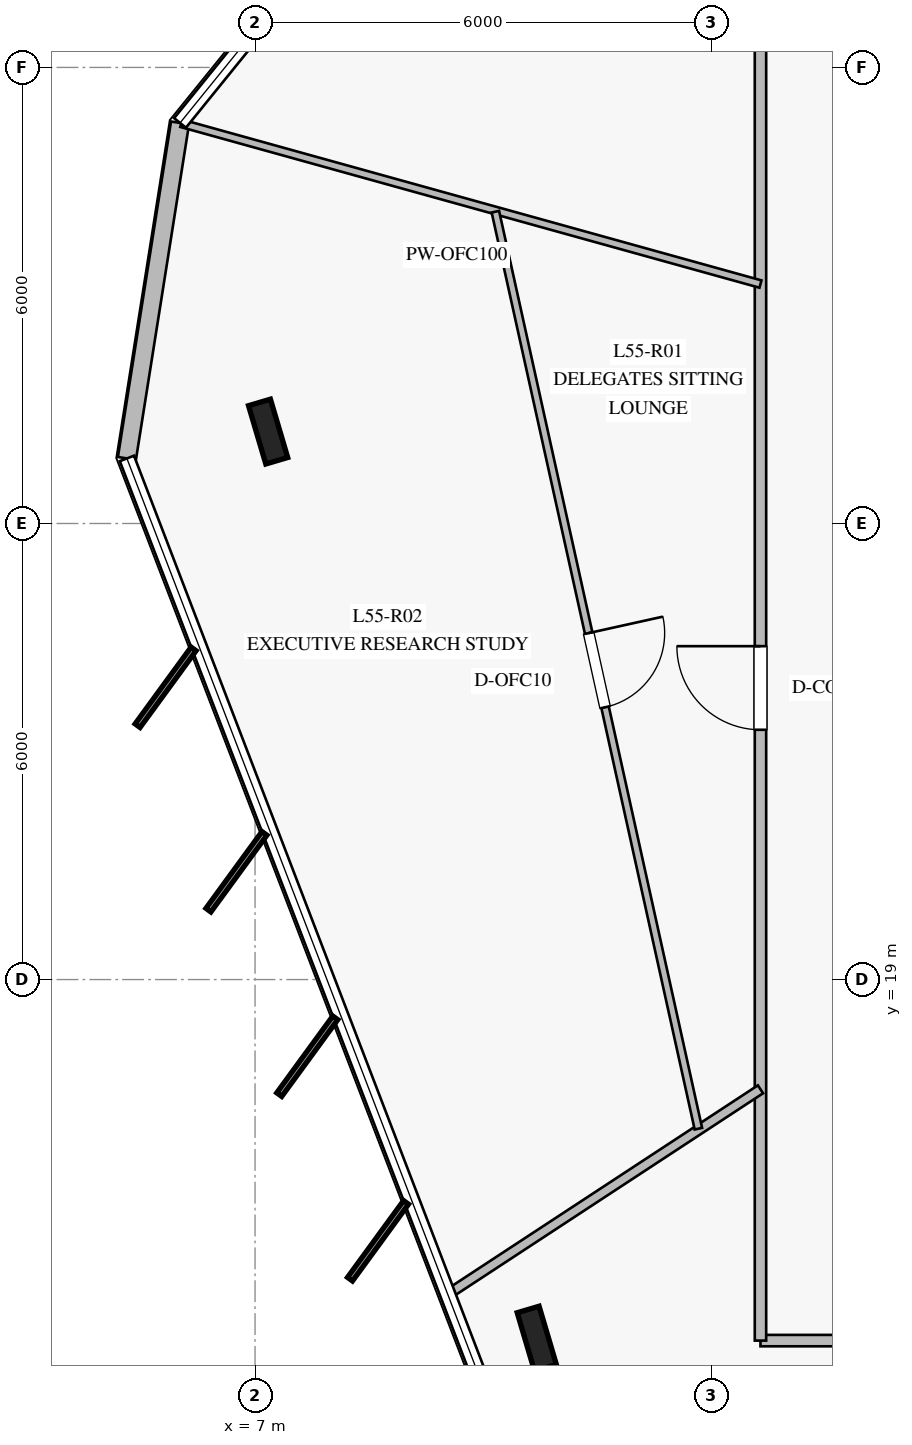
"""IFC4 building model, lengths in metres.
Left out: names, types, materials, properties, quantities, classifications, styles, units other than length and angle.
Written with IfcOpenShell. Run it as: python <this file> out.ifc"""

import sys

from ifc_helpers import new_model, si_unit, direction, frame, frame_2d, origin, origin_2d, place, context, subcontext, project, spatial, rectangle, i_section, extrude, element, fill, save


model = new_model("IFC4")
c1 = context("Model", 3, precision=1e-05, world=origin(), true_north=direction((0.0, 1.0)))
c2 = subcontext(c1, "Body", "Model", "MODEL_VIEW")
j1 = project(units=[si_unit("LENGTHUNIT", "METRE"), si_unit("PLANEANGLEUNIT", "RADIAN")], contexts=[c1])
p1 = place(None, origin())
s1 = spatial("IfcSite", under=j1, at=p1, CompositionType="ELEMENT")
p2 = place(p1, origin())
s2 = spatial("IfcBuilding", under=s1, at=p2, CompositionType="ELEMENT")
p3 = place(p2, frame((0.0, 0.0, 228.8)))
s3 = spatial("IfcBuildingStorey", under=s2, at=p3, CompositionType="ELEMENT", Elevation=228.8)
for number, where, z_axis, x_axis in (
    (1, (7.172, 26.209, 0.0), (0.0, 0.0, 1.0), (-0.284, 0.959, 0.0)),
    (2, (10.707, 14.276, 0.0), (0.0, 0.0, 1.0), (-0.284, 0.959, 0.0)),
):
    element("IfcColumn", number, at=place(p3, frame(where, z_axis=z_axis, x_axis=x_axis)), inside=s3, PredefinedType="COLUMN", context=c2, shape_type="SweptSolid", body=[
        extrude(i_section(OverallWidth=0.3, OverallDepth=0.8, WebThickness=0.018, FlangeThickness=0.033, at=origin_2d()), origin(), (0.0, 0.0, 1.0), 4.0),
    ])
p4 = place(p3, frame((6.013, 30.27, 0.0), z_axis=(0.0, 0.0, 1.0), x_axis=(-0.156402986275, -0.987693325828, 0.0)))
e3 = element("IfcWall", 3, at=p4, inside=s3, PredefinedType="STANDARD", context=c2, shape_type="SweptSolid", body=[
    extrude(rectangle(XDim=4.469, YDim=0.24, at=frame_2d((2.234, 0.0))), origin(), (0.0, 0.0, 1.0), 3.78),
])
p5 = place(p3, frame((36.35, 14.25, 0.0), z_axis=(0.0, 0.0, 1.0), x_axis=(-1.0, 0.0, 0.0)))
e4 = element("IfcWall", 4, at=p5, inside=s3, PredefinedType="PARTITIONING", context=c2, shape_type="SweptSolid", body=[
    extrude(rectangle(XDim=22.7, YDim=0.15, at=frame_2d((11.35, 0.0))), origin(), (0.0, 0.0, 1.0), 3.05),
])
p6 = place(p5, frame((16.272, 0.0, 0.0)))
e5 = element("IfcOpeningElement", 5, at=p6, cuts=e4, PredefinedType="OPENING", context=c2, shape_type="SweptSolid", body=[
    extrude(rectangle(XDim=1.1, YDim=2.2, at=frame_2d((0.55, 1.1))), frame((0.0, 0.085, 0.0), z_axis=(0.0, -1.0, 0.0), x_axis=(1.0, 0.0, 0.0)), (0.0, 0.0, 1.0), 0.17),
])
p7 = place(p3, frame((13.65, 14.25, 0.0), z_axis=(0.0, 0.0, 1.0), x_axis=(0.0, 1.0, 0.0)))
e6 = element("IfcWall", 6, at=p7, inside=s3, PredefinedType="PARTITIONING", context=c2, shape_type="SweptSolid", body=[
    extrude(rectangle(XDim=21.5, YDim=0.15, at=frame_2d((10.75, 0.0))), origin(), (0.0, 0.0, 1.0), 3.02),
])
p8 = place(p7, frame((8.036, 0.0, 0.0)))
e7 = element("IfcOpeningElement", 7, at=p8, cuts=e6, PredefinedType="OPENING", context=c2, shape_type="SweptSolid", body=[
    extrude(rectangle(XDim=1.1, YDim=2.2, at=frame_2d((0.55, 1.1))), frame((0.0, 0.085, 0.0), z_axis=(0.0, -1.0, 0.0), x_axis=(1.0, 0.0, 0.0)), (0.0, 0.0, 1.0), 0.17),
])
p9 = place(p3, frame((13.65, 28.15, 0.0), z_axis=(0.0, 0.0, 1.0), x_axis=(-0.963571409142, 0.267451190843, 0.0)))
e8 = element("IfcWall", 8, at=p9, inside=s3, PredefinedType="MOVABLE", context=c2, shape_type="SweptSolid", body=[
    extrude(rectangle(XDim=7.908, YDim=0.1, at=frame_2d((3.954, 0.0))), origin(), (0.0, 0.0, 1.0), 3.02),
])
p10 = place(p3, frame((13.65, 17.556, 0.0), z_axis=(0.0, 0.0, 1.0), x_axis=(-0.836194204711, -0.54843345267, 0.0)))
e9 = element("IfcWall", 9, at=p10, inside=s3, PredefinedType="PARTITIONING", context=c2, shape_type="SweptSolid", body=[
    extrude(rectangle(XDim=4.903, YDim=0.125, at=frame_2d((2.452, 0.0))), origin(), (0.0, 0.0, 1.0), 3.18),
])
p11 = place(p3, frame((10.162, 29.102, 0.0), z_axis=(0.0, 0.0, 1.0), x_axis=(0.216160497281, -0.976357843936, 0.0)))
e10 = element("IfcWall", 10, at=p11, inside=s3, PredefinedType="MOVABLE", context=c2, shape_type="SweptSolid", body=[
    extrude(rectangle(XDim=12.356, YDim=0.1, at=frame_2d((6.178, 0.0))), origin(), (0.0, 0.0, 1.0), 3.22),
])
p12 = place(p11, frame((5.678, 0.0, 0.0)))
e11 = element("IfcOpeningElement", 11, at=p12, cuts=e10, PredefinedType="OPENING", context=c2, shape_type="SweptSolid", body=[
    extrude(rectangle(XDim=1.0, YDim=2.15, at=frame_2d((0.5, 1.075))), frame((0.0, 0.06, 0.0), z_axis=(0.0, -1.0, 0.0), x_axis=(1.0, 0.0, 0.0)), (0.0, 0.0, 1.0), 0.12),
])
p13 = place(p8, origin())
e12 = element("IfcDoor", 12, at=p13, inside=s3, OperationType="SINGLE_SWING_RIGHT", PredefinedType="DOOR", context=c2, shape_type="SweptSolid", body=[
    extrude(rectangle(XDim=1.1, YDim=2.2, at=frame_2d((0.55, 1.1))), frame((0.0, 0.025, 0.0), z_axis=(0.0, -1.0, 0.0), x_axis=(1.0, 0.0, 0.0)), (0.0, 0.0, 1.0), 0.05),
])
fill(e7, e12)
p14 = place(p12, origin())
e13 = element("IfcDoor", 13, at=p14, inside=s3, OperationType="SINGLE_SWING_LEFT", PredefinedType="DOOR", context=c2, shape_type="SweptSolid", body=[
    extrude(rectangle(XDim=1.0, YDim=2.15, at=frame_2d((0.5, 1.075))), frame((0.0, 0.025, 0.0), z_axis=(0.0, -1.0, 0.0), x_axis=(1.0, 0.0, 0.0)), (0.0, 0.0, 1.0), 0.05),
])
fill(e11, e13)
save(model, sys.argv[1])
